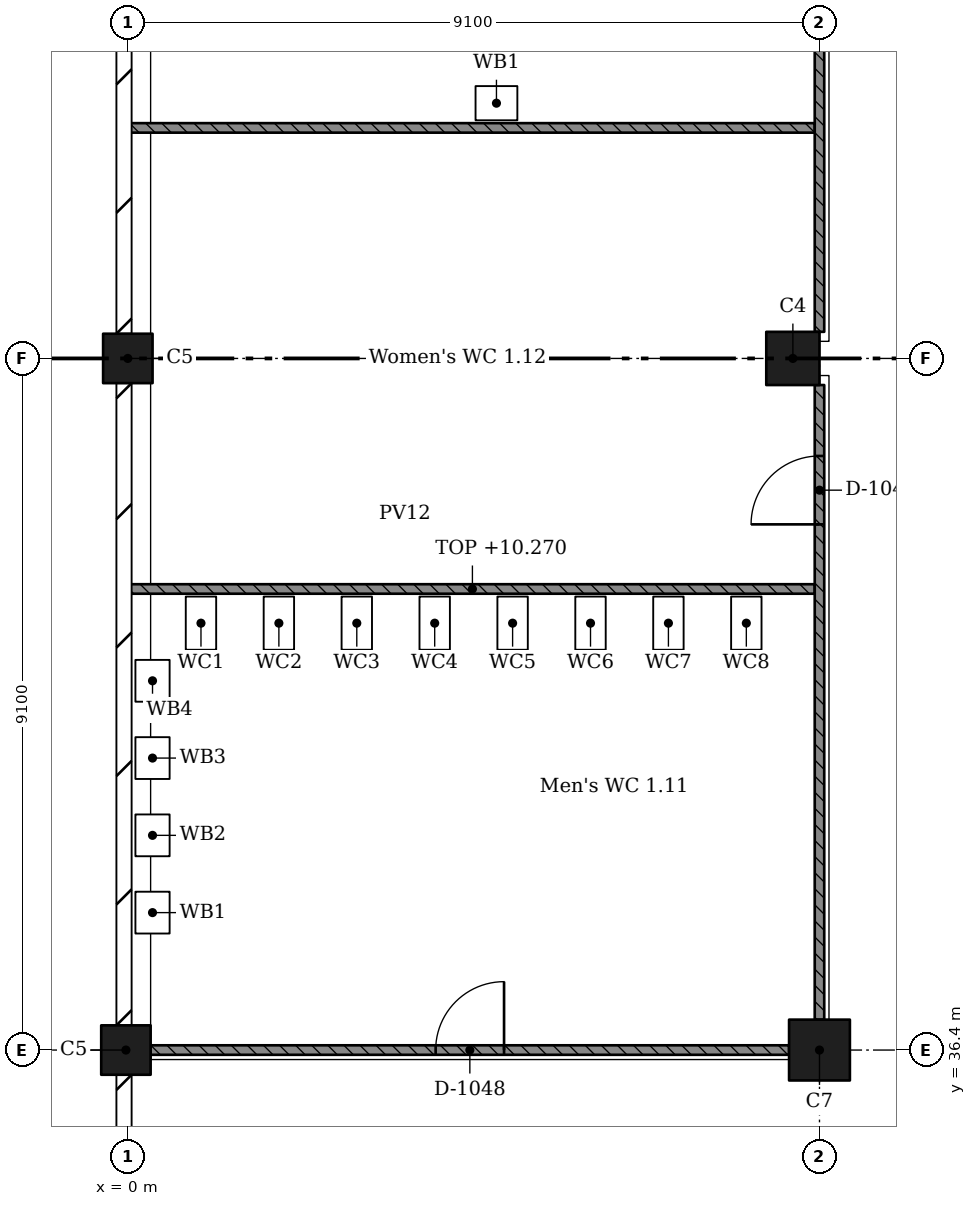
"""IFC4 building model, lengths in metres.
Left out: names, types, materials, properties, quantities, classifications, styles, units other than length and angle.
Written with IfcOpenShell. Run it as: python <this file> out.ifc"""

import sys

from ifc_helpers import new_model, si_unit, direction, frame, frame_2d, origin, origin_2d, place, context, subcontext, project, spatial, rectangle, extrude, element, fill, save


model = new_model("IFC4")
c1 = context("Model", 3, precision=1e-05, world=origin(), true_north=direction((0.0, 1.0)))
c2 = subcontext(c1, "Body", "Model", "MODEL_VIEW")
j1 = project(units=[si_unit("LENGTHUNIT", "METRE"), si_unit("PLANEANGLEUNIT", "RADIAN")], contexts=[c1])
p1 = place(None, origin())
s1 = spatial("IfcSite", under=j1, at=p1, CompositionType="ELEMENT")
p2 = place(p1, origin())
s2 = spatial("IfcBuilding", under=s1, at=p2, CompositionType="ELEMENT")
p3 = place(p2, frame((0.0, 0.0, 6.37)))
s3 = spatial("IfcBuildingStorey", under=s2, at=p3, CompositionType="ELEMENT", Elevation=6.37)
for number, where, z_axis, x_axis in (
    (1, (-0.025, 36.4, 0.0), (0.0, 0.0, 1.0), (1.0, 0.0, 0.0)),
    (2, (0.0, 45.5, 0.0), (0.0, 0.0, 1.0), (1.0, 0.0, 0.0)),
):
    element("IfcColumn", number, at=place(p3, frame(where, z_axis=z_axis, x_axis=x_axis)), inside=s3, PredefinedType="COLUMN", context=c2, shape_type="SweptSolid", body=[
        extrude(rectangle(XDim=0.65, YDim=0.65, at=origin_2d()), origin(), (0.0, 0.0, 1.0), 4.55),
    ])
p4 = place(p3, frame((9.1, 36.4, 0.0), z_axis=(0.0, 0.0, 1.0), x_axis=(1.0, 0.0, 0.0)))
e3 = element("IfcColumn", 3, at=p4, inside=s3, PredefinedType="COLUMN", context=c2, shape_type="SweptSolid", body=[
    extrude(rectangle(XDim=0.8, YDim=0.8, at=origin_2d()), origin(), (0.0, 0.0, 1.0), 4.55),
])
p5 = place(p3, frame((8.75, 45.5, 0.0), z_axis=(0.0, 0.0, 1.0), x_axis=(1.0, 0.0, 0.0)))
e4 = element("IfcColumn", 4, at=p5, inside=s3, PredefinedType="COLUMN", context=c2, shape_type="SweptSolid", body=[
    extrude(rectangle(XDim=0.7, YDim=0.7, at=origin_2d()), origin(), (0.0, 0.0, 1.0), 4.55),
])
for number, where, z_axis, x_axis in (
    (5, (0.03, 42.467, 0.0), (0.0, 0.0, 1.0), (1.0, 0.0, 0.0)),
    (6, (0.03, 48.533, 0.0), (0.0, 0.0, 1.0), (1.0, 0.0, 0.0)),
):
    element("IfcWall", number, at=place(p3, frame(where, z_axis=z_axis, x_axis=x_axis)), inside=s3, PredefinedType="PARTITIONING", context=c2, shape_type="SweptSolid", body=[
        extrude(rectangle(XDim=9.008, YDim=0.125, at=frame_2d((4.504, 0.0))), origin(), (0.0, 0.0, 1.0), 3.9),
    ])
p6 = place(p3, frame((0.3, 36.4, 0.0), z_axis=(0.0, 0.0, 1.0), x_axis=(1.0, 0.0, 0.0)))
e7 = element("IfcWall", 7, at=p6, inside=s3, PredefinedType="PARTITIONING", context=c2, shape_type="SweptSolid", body=[
    extrude(rectangle(XDim=8.4, YDim=0.125, at=frame_2d((4.2, 0.0))), origin(), (0.0, 0.0, 1.0), 3.9),
])
p7 = place(p6, frame((3.75, 0.0, 0.0)))
e8 = element("IfcOpeningElement", 8, at=p7, cuts=e7, PredefinedType="OPENING", context=c2, shape_type="SweptSolid", body=[
    extrude(rectangle(XDim=0.9, YDim=2.1, at=frame_2d((0.45, 1.05))), frame((0.0, 0.073, 0.0), z_axis=(0.0, -1.0, 0.0), x_axis=(1.0, 0.0, 0.0)), (0.0, 0.0, 1.0), 0.145),
])
p8 = place(p3, frame((9.1, 36.8, 0.0), z_axis=(0.0, 0.0, 1.0), x_axis=(0.0, 1.0, 0.0)))
e9 = element("IfcWall", 9, at=p8, inside=s3, PredefinedType="PARTITIONING", context=c2, shape_type="SweptSolid", body=[
    extrude(rectangle(XDim=8.35, YDim=0.125, at=frame_2d((4.175, 0.0))), origin(), (0.0, 0.0, 1.0), 3.9),
])
p9 = place(p8, frame((6.517, 0.0, 0.0)))
e10 = element("IfcOpeningElement", 10, at=p9, cuts=e9, PredefinedType="OPENING", context=c2, shape_type="SweptSolid", body=[
    extrude(rectangle(XDim=0.9, YDim=2.1, at=frame_2d((0.45, 1.05))), frame((0.0, 0.073, 0.0), z_axis=(0.0, -1.0, 0.0), x_axis=(1.0, 0.0, 0.0)), (0.0, 0.0, 1.0), 0.145),
])
p10 = place(p3, frame((9.1, 45.85, 0.0), z_axis=(0.0, 0.0, 1.0), x_axis=(0.0, 1.0, 0.0)))
e11 = element("IfcWall", 11, at=p10, inside=s3, PredefinedType="PARTITIONING", context=c2, shape_type="SweptSolid", body=[
    extrude(rectangle(XDim=8.4, YDim=0.125, at=frame_2d((4.2, 0.0))), origin(), (0.0, 0.0, 1.0), 3.9),
])
p11 = place(p10, frame((5.033, 0.0, 0.0)))
e12 = element("IfcOpeningElement", 12, at=p11, cuts=e11, PredefinedType="OPENING", context=c2, shape_type="SweptSolid", body=[
    extrude(rectangle(XDim=1.0, YDim=2.1, at=frame_2d((0.5, 1.05))), frame((0.0, 0.073, 0.0), z_axis=(0.0, -1.0, 0.0), x_axis=(1.0, 0.0, 0.0)), (0.0, 0.0, 1.0), 0.145),
])
p12 = place(p7, origin())
e13 = element("IfcDoor", 13, at=p12, inside=s3, OperationType="SINGLE_SWING_LEFT", PredefinedType="DOOR", context=c2, shape_type="SweptSolid", body=[
    extrude(rectangle(XDim=0.9, YDim=2.1, at=frame_2d((0.45, 1.05))), frame((0.0, 0.025, 0.0), z_axis=(0.0, -1.0, 0.0), x_axis=(1.0, 0.0, 0.0)), (0.0, 0.0, 1.0), 0.05),
])
fill(e8, e13)
p13 = place(p9, origin())
e14 = element("IfcDoor", 14, at=p13, inside=s3, OperationType="SINGLE_SWING_RIGHT", PredefinedType="DOOR", context=c2, shape_type="SweptSolid", body=[
    extrude(rectangle(XDim=0.9, YDim=2.1, at=frame_2d((0.45, 1.05))), frame((0.0, 0.025, 0.0), z_axis=(0.0, -1.0, 0.0), x_axis=(1.0, 0.0, 0.0)), (0.0, 0.0, 1.0), 0.05),
])
fill(e10, e14)
save(model, sys.argv[1])
